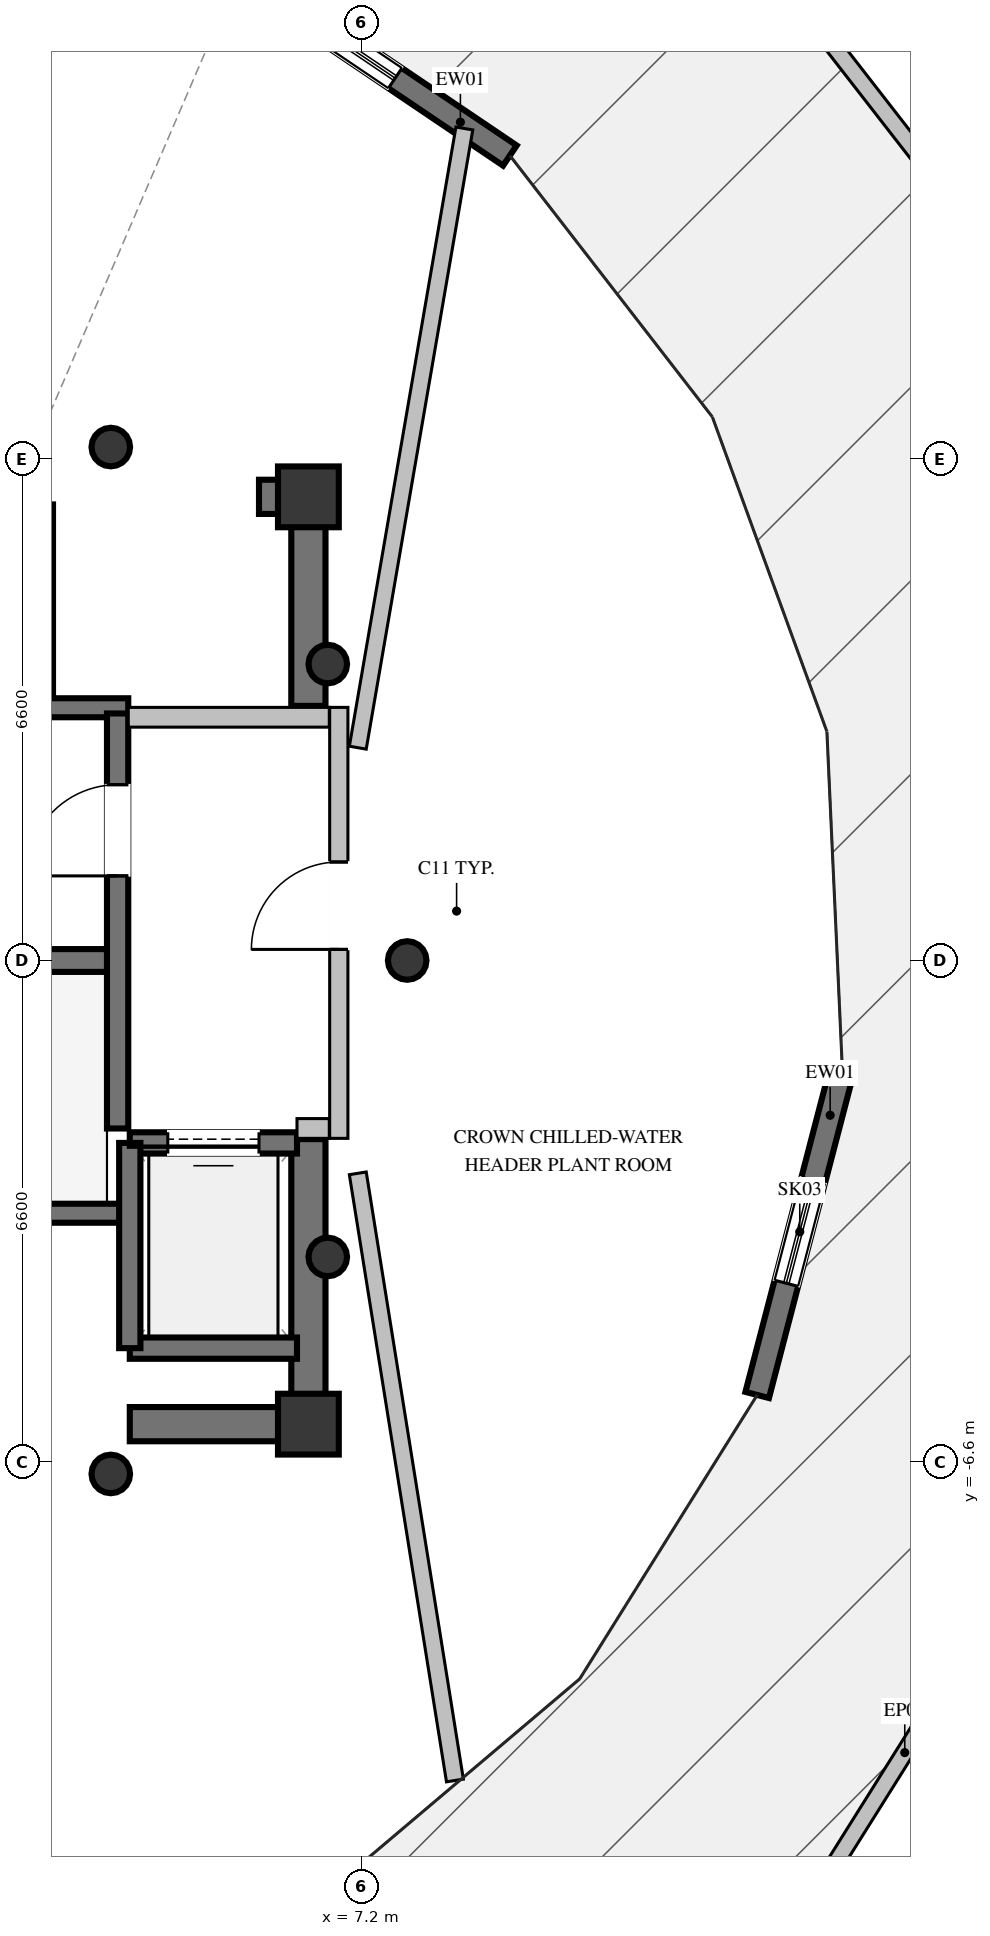
"""IFC4 building model, lengths in metres.
Left out: names, types, materials, properties, quantities, classifications, styles, units other than length and angle.
Written with IfcOpenShell. Run it as: python <this file> out.ifc"""

import sys

from ifc_helpers import new_model, si_unit, direction, frame, frame_2d, origin, origin_2d, place, context, subcontext, project, spatial, rectangle, hollow_circle, extrude, element, fill, save


model = new_model("IFC4")
c1 = context("Model", 3, precision=1e-05, world=origin(), true_north=direction((0.0, 1.0)))
c2 = subcontext(c1, "Body", "Model", "MODEL_VIEW")
j1 = project(units=[si_unit("LENGTHUNIT", "METRE"), si_unit("PLANEANGLEUNIT", "RADIAN")], contexts=[c1])
p1 = place(None, origin())
s1 = spatial("IfcSite", under=j1, at=p1, CompositionType="ELEMENT")
p2 = place(p1, origin())
s2 = spatial("IfcBuilding", under=s1, at=p2, CompositionType="ELEMENT")
p3 = place(p2, frame((0.0, 0.0, 302.2)))
s3 = spatial("IfcBuildingStorey", under=s2, at=p3, CompositionType="ELEMENT", Elevation=302.2)
for number, where, z_axis, x_axis in (
    (1, (6.5, -6.1, 0.0), (0.0, 0.0, 1.0), (1.0, 0.0, 0.0)),
    (2, (6.5, 6.1, 0.0), (0.0, 0.0, 1.0), (1.0, 0.0, 0.0)),
):
    element("IfcColumn", number, at=place(p3, frame(where, z_axis=z_axis, x_axis=x_axis)), inside=s3, PredefinedType="COLUMN", context=c2, shape_type="SweptSolid", body=[
        extrude(rectangle(XDim=0.8, YDim=0.8, at=origin_2d()), origin(), (0.0, 0.0, 1.0), 6.0),
    ])
p4 = place(p3, frame((-3.99, 0.0, 0.0), z_axis=(0.0, 0.0, 1.0), x_axis=(1.0, 0.0, 0.0)))
e3 = element("IfcWall", 3, at=p4, inside=s3, PredefinedType="SHEAR", context=c2, shape_type="SweptSolid", body=[
    extrude(rectangle(XDim=7.98, YDim=0.3, at=frame_2d((3.99, 0.0))), origin(), (0.0, 0.0, 1.0), 6.0),
])
for number, where, z_axis, x_axis in (
    (4, (-4.13, -3.325, 0.0), (0.0, 0.0, 1.0), (1.0, 0.0, 0.0)),
    (5, (-4.13, 3.325, 0.0), (0.0, 0.0, 1.0), (1.0, 0.0, 0.0)),
):
    element("IfcWall", number, at=place(p3, frame(where, z_axis=z_axis, x_axis=x_axis)), inside=s3, PredefinedType="SOLIDWALL", context=c2, shape_type="SweptSolid", body=[
        extrude(rectangle(XDim=8.26, YDim=0.25, at=frame_2d((4.13, 0.0))), origin(), (0.0, 0.0, 1.0), 6.0),
    ])
p5 = place(p3, frame((4.15, -6.1, 0.0), z_axis=(0.0, 0.0, 1.0), x_axis=(1.0, 0.0, 0.0)))
e6 = element("IfcWall", 6, at=p5, inside=s3, PredefinedType="SHEAR", context=c2, shape_type="SweptSolid", body=[
    extrude(rectangle(XDim=2.125, YDim=0.45, at=frame_2d((1.062, 0.0))), origin(), (0.0, 0.0, 1.0), 6.0),
])
p6 = place(p3, frame((5.85, 6.1, 0.0), z_axis=(0.0, 0.0, 1.0), x_axis=(1.0, 0.0, 0.0)))
e7 = element("IfcWall", 7, at=p6, inside=s3, PredefinedType="SHEAR", context=c2, shape_type="SweptSolid", body=[
    extrude(rectangle(XDim=0.425, YDim=0.45, at=frame_2d((0.212, 0.0))), origin(), (0.0, 0.0, 1.0), 6.0),
])
p7 = place(p3, frame((6.5, -6.325, 0.0), z_axis=(0.0, 0.0, 1.0), x_axis=(0.0, 1.0, 0.0)))
e8 = element("IfcWall", 8, at=p7, inside=s3, PredefinedType="SHEAR", context=c2, shape_type="SweptSolid", body=[
    extrude(rectangle(XDim=3.975, YDim=0.45, at=frame_2d((1.987, 0.0))), origin(), (0.0, 0.0, 1.0), 6.0),
])
p8 = place(p3, frame((6.5, 3.35, 0.0), z_axis=(0.0, 0.0, 1.0), x_axis=(0.0, 1.0, 0.0)))
e9 = element("IfcWall", 9, at=p8, inside=s3, PredefinedType="SHEAR", context=c2, shape_type="SweptSolid", body=[
    extrude(rectangle(XDim=2.975, YDim=0.45, at=frame_2d((1.487, 0.0))), origin(), (0.0, 0.0, 1.0), 6.0),
])
for number, where, z_axis, x_axis in (
    (10, (7.8, 0.0, 0.0), (0.0, 0.0, 1.0), (1.0, 0.0, 0.0)),
    (11, (6.755, 3.9, 0.0), (0.0, 0.0, 1.0), (1.0, 0.0, 0.0)),
    (12, (3.9, 6.755, 0.0), (0.0, 0.0, 1.0), (1.0, 0.0, 0.0)),
    (13, (3.9, -6.755, 0.0), (0.0, 0.0, 1.0), (1.0, 0.0, 0.0)),
    (14, (6.755, -3.9, 0.0), (0.0, 0.0, 1.0), (1.0, 0.0, 0.0)),
):
    element("IfcColumn", number, at=place(p3, frame(where, z_axis=z_axis, x_axis=x_axis)), inside=s3, PredefinedType="COLUMN", context=c2, shape_type="SweptSolid", body=[
        extrude(hollow_circle(Radius=0.254, WallThickness=0.02, at=origin_2d()), origin(), (0.0, 0.0, 1.0), 6.0),
    ])
p9 = place(p3, frame((13.525, -1.422, 0.0), z_axis=(0.0, 0.0, 1.0), x_axis=(-0.252361427014, -0.967633045196, 0.0)))
e15 = element("IfcWall", 15, at=p9, inside=s3, PredefinedType="SOLIDWALL", context=c2, shape_type="SweptSolid", body=[
    extrude(rectangle(XDim=4.438, YDim=0.32, at=frame_2d((2.219, 0.0))), origin(), (0.0, 0.0, 1.0), 5.72),
])
p10 = place(p9, frame((1.519, 0.0, 0.6)))
e16 = element("IfcOpeningElement", 16, at=p10, cuts=e15, PredefinedType="OPENING", context=c2, shape_type="SweptSolid", body=[
    extrude(rectangle(XDim=1.4, YDim=1.8, at=frame_2d((0.7, 0.9))), frame((0.0, 0.17, 0.0), z_axis=(0.0, -1.0, 0.0), x_axis=(1.0, 0.0, 0.0)), (0.0, 0.0, 1.0), 0.34),
])
p11 = place(p3, frame((5.591, 12.992, 0.0), z_axis=(0.0, 0.0, 1.0), x_axis=(0.828958724837, -0.559309782247, 0.0)))
e17 = element("IfcWall", 17, at=p11, inside=s3, PredefinedType="SOLIDWALL", context=c2, shape_type="SweptSolid", body=[
    extrude(rectangle(XDim=4.294, YDim=0.32, at=frame_2d((2.147, 0.0))), origin(), (0.0, 0.0, 1.0), 5.72),
])
p12 = place(p11, frame((0.974, 0.0, 1.1)))
e18 = element("IfcOpeningElement", 18, at=p12, cuts=e17, PredefinedType="OPENING", context=c2, shape_type="SweptSolid", body=[
    extrude(rectangle(XDim=1.5, YDim=1.2, at=frame_2d((0.75, 0.6))), frame((0.0, 0.17, 0.0), z_axis=(0.0, -1.0, 0.0), x_axis=(1.0, 0.0, 0.0)), (0.0, 0.0, 1.0), 0.34),
])
p13 = place(p3, frame((12.738, -12.985, 0.0), z_axis=(0.0, 0.0, 1.0), x_axis=(0.53141560639, 0.847111240207, 0.0)))
e19 = element("IfcWall", 19, at=p13, inside=s3, PredefinedType="PARAPET", context=c2, shape_type="SweptSolid", body=[
    extrude(rectangle(XDim=6.054, YDim=0.22, at=frame_2d((3.027, 0.0))), origin(), (0.0, 0.0, 1.0), 1.2),
])
p14 = place(p3, frame((15.134, 9.813, 0.0), z_axis=(0.0, 0.0, 1.0), x_axis=(-0.613915195136, 0.78937198657, 0.0)))
e20 = element("IfcWall", 20, at=p14, inside=s3, PredefinedType="PARAPET", context=c2, shape_type="SweptSolid", body=[
    extrude(rectangle(XDim=5.985, YDim=0.22, at=frame_2d((2.992, 0.0))), origin(), (0.0, 0.0, 1.0), 1.2),
])
p15 = place(p3, frame((3.0, 3.5, 0.0), z_axis=(0.0, 0.0, 1.0), x_axis=(0.0, 1.0, 0.0)))
e21 = element("IfcWall", 21, at=p15, inside=s3, PredefinedType="SOLIDWALL", context=c2, shape_type="SweptSolid", body=[
    extrude(rectangle(XDim=2.5, YDim=0.28, at=frame_2d((1.25, 0.0))), origin(), (0.0, 0.0, 1.0), 5.72),
])
p16 = place(p3, frame((4.15, -5.1, 0.0), z_axis=(0.0, 0.0, 1.0), x_axis=(1.0, 0.0, 0.0)))
e22 = element("IfcWall", 22, at=p16, inside=s3, PredefinedType="SOLIDWALL", context=c2, shape_type="SweptSolid", body=[
    extrude(rectangle(XDim=2.2, YDim=0.28, at=frame_2d((1.1, 0.0))), origin(), (0.0, 0.0, 1.0), 5.72),
])
p17 = place(p3, frame((6.35, -2.4, 0.0), z_axis=(0.0, 0.0, 1.0), x_axis=(-1.0, 0.0, 0.0)))
e23 = element("IfcWall", 23, at=p17, inside=s3, PredefinedType="SOLIDWALL", context=c2, shape_type="SweptSolid", body=[
    extrude(rectangle(XDim=2.2, YDim=0.28, at=frame_2d((1.1, 0.0))), origin(), (0.0, 0.0, 1.0), 5.72),
])
p18 = place(p17, frame((0.5, 0.0, 0.0)))
e24 = element("IfcOpeningElement", 24, at=p18, cuts=e23, PredefinedType="OPENING", context=c2, shape_type="SweptSolid", body=[
    extrude(rectangle(XDim=1.2, YDim=2.2, at=frame_2d((0.6, 1.1))), frame((0.0, 0.15, 0.0), z_axis=(0.0, -1.0, 0.0), x_axis=(1.0, 0.0, 0.0)), (0.0, 0.0, 1.0), 0.3),
])
p19 = place(p3, frame((4.15, -2.4, 0.0), z_axis=(0.0, 0.0, 1.0), x_axis=(0.0, -1.0, 0.0)))
e25 = element("IfcWall", 25, at=p19, inside=s3, PredefinedType="SOLIDWALL", context=c2, shape_type="SweptSolid", body=[
    extrude(rectangle(XDim=2.7, YDim=0.28, at=frame_2d((1.35, 0.0))), origin(), (0.0, 0.0, 1.0), 5.72),
])
p20 = place(p3, frame((3.99, -2.21, 0.0), z_axis=(0.0, 0.0, 1.0), x_axis=(0.0, 1.0, 0.0)))
e26 = element("IfcWall", 26, at=p20, inside=s3, PredefinedType="SOLIDWALL", context=c2, shape_type="SweptSolid", body=[
    extrude(rectangle(XDim=5.46, YDim=0.28, at=frame_2d((2.73, 0.0))), origin(), (0.0, 0.0, 1.0), 5.72),
])
p21 = place(p20, frame((3.323, 0.0, 0.0)))
e27 = element("IfcOpeningElement", 27, at=p21, cuts=e26, PredefinedType="OPENING", context=c2, shape_type="SweptSolid", body=[
    extrude(rectangle(XDim=1.2, YDim=2.2, at=frame_2d((0.6, 1.1))), frame((0.0, 0.15, 0.0), z_axis=(0.0, -1.0, 0.0), x_axis=(1.0, 0.0, 0.0)), (0.0, 0.0, 1.0), 0.3),
])
p22 = place(p3, frame((6.9, -2.34, 0.0), z_axis=(0.0, 0.0, 1.0), x_axis=(0.0, 1.0, 0.0)))
e28 = element("IfcWall", 28, at=p22, inside=s3, PredefinedType="PARTITIONING", context=c2, shape_type="SweptSolid", body=[
    extrude(rectangle(XDim=5.67, YDim=0.24, at=frame_2d((2.835, 0.0))), origin(), (0.0, 0.0, 1.0), 4.405),
])
p23 = place(p22, frame((2.486, 0.0, 0.0)))
e29 = element("IfcOpeningElement", 29, at=p23, cuts=e28, PredefinedType="OPENING", context=c2, shape_type="SweptSolid", body=[
    extrude(rectangle(XDim=1.15, YDim=2.2, at=frame_2d((0.575, 1.1))), frame((0.0, 0.13, 0.0), z_axis=(0.0, -1.0, 0.0), x_axis=(1.0, 0.0, 0.0)), (0.0, 0.0, 1.0), 0.26),
])
p24 = place(p3, frame((6.35, -2.21, 0.0), z_axis=(0.0, 0.0, 1.0), x_axis=(1.0, 0.0, 0.0)))
e30 = element("IfcWall", 30, at=p24, inside=s3, PredefinedType="PARTITIONING", context=c2, shape_type="SweptSolid", body=[
    extrude(rectangle(XDim=0.425, YDim=0.26, at=frame_2d((0.212, 0.0))), origin(), (0.0, 0.0, 1.0), 5.72),
])
p25 = place(p3, frame((4.13, 3.2, 0.0), z_axis=(0.0, 0.0, 1.0), x_axis=(1.0, 0.0, 0.0)))
e31 = element("IfcWall", 31, at=p25, inside=s3, PredefinedType="PARTITIONING", context=c2, shape_type="SweptSolid", body=[
    extrude(rectangle(XDim=2.645, YDim=0.26, at=frame_2d((1.323, 0.0))), origin(), (0.0, 0.0, 1.0), 5.72),
])
p26 = place(p3, frame((7.15, 2.8, 0.0), z_axis=(0.0, 0.0, 1.0), x_axis=(0.169626996892, 0.985508336812, 0.0)))
e32 = element("IfcWall", 32, at=p26, inside=s3, PredefinedType="PARTITIONING", context=c2, shape_type="SweptSolid", body=[
    extrude(rectangle(XDim=8.266, YDim=0.225, at=frame_2d((4.133, 0.0))), origin(), (0.0, 0.0, 1.0), 4.405),
])
p27 = place(p3, frame((7.15, -2.8, 0.0), z_axis=(0.0, 0.0, 1.0), x_axis=(0.157989324062, -0.987440820243, 0.0)))
e33 = element("IfcWall", 33, at=p27, inside=s3, PredefinedType="PARTITIONING", context=c2, shape_type="SweptSolid", body=[
    extrude(rectangle(XDim=8.09, YDim=0.225, at=frame_2d((4.045, 0.0))), origin(), (0.0, 0.0, 1.0), 4.405),
])
p28 = place(p10, origin())
e34 = element("IfcWindow", 34, at=p28, inside=s3, PartitioningType="SINGLE_PANEL", PredefinedType="SKYLIGHT", context=c2, shape_type="SweptSolid", body=[
    extrude(rectangle(XDim=1.4, YDim=1.8, at=frame_2d((0.7, 0.9))), frame((0.0, 0.03, 0.0), z_axis=(0.0, -1.0, 0.0), x_axis=(1.0, 0.0, 0.0)), (0.0, 0.0, 1.0), 0.06),
])
fill(e16, e34)
p29 = place(p12, origin())
e35 = element("IfcWindow", 35, at=p29, inside=s3, PartitioningType="SINGLE_PANEL", PredefinedType="WINDOW", context=c2, shape_type="SweptSolid", body=[
    extrude(rectangle(XDim=1.5, YDim=1.2, at=frame_2d((0.75, 0.6))), frame((0.0, 0.03, 0.0), z_axis=(0.0, -1.0, 0.0), x_axis=(1.0, 0.0, 0.0)), (0.0, 0.0, 1.0), 0.06),
])
fill(e18, e35)
p30 = place(p18, origin())
e36 = element("IfcDoor", 36, at=p30, inside=s3, OperationType="SLIDING_TO_LEFT", PredefinedType="DOOR", context=c2, shape_type="SweptSolid", body=[
    extrude(rectangle(XDim=1.2, YDim=2.2, at=frame_2d((0.6, 1.1))), frame((0.0, 0.025, 0.0), z_axis=(0.0, -1.0, 0.0), x_axis=(1.0, 0.0, 0.0)), (0.0, 0.0, 1.0), 0.05),
])
fill(e24, e36)
p31 = place(p21, origin())
e37 = element("IfcDoor", 37, at=p31, inside=s3, OperationType="SINGLE_SWING_LEFT", PredefinedType="DOOR", context=c2, shape_type="SweptSolid", body=[
    extrude(rectangle(XDim=1.2, YDim=2.2, at=frame_2d((0.6, 1.1))), frame((0.0, 0.025, 0.0), z_axis=(0.0, -1.0, 0.0), x_axis=(1.0, 0.0, 0.0)), (0.0, 0.0, 1.0), 0.05),
])
fill(e27, e37)
p32 = place(p23, origin())
e38 = element("IfcDoor", 38, at=p32, inside=s3, OperationType="SINGLE_SWING_LEFT", PredefinedType="DOOR", context=c2, shape_type="SweptSolid", body=[
    extrude(rectangle(XDim=1.15, YDim=2.2, at=frame_2d((0.575, 1.1))), frame((0.0, 0.025, 0.0), z_axis=(0.0, -1.0, 0.0), x_axis=(1.0, 0.0, 0.0)), (0.0, 0.0, 1.0), 0.05),
])
fill(e29, e38)
save(model, sys.argv[1])
